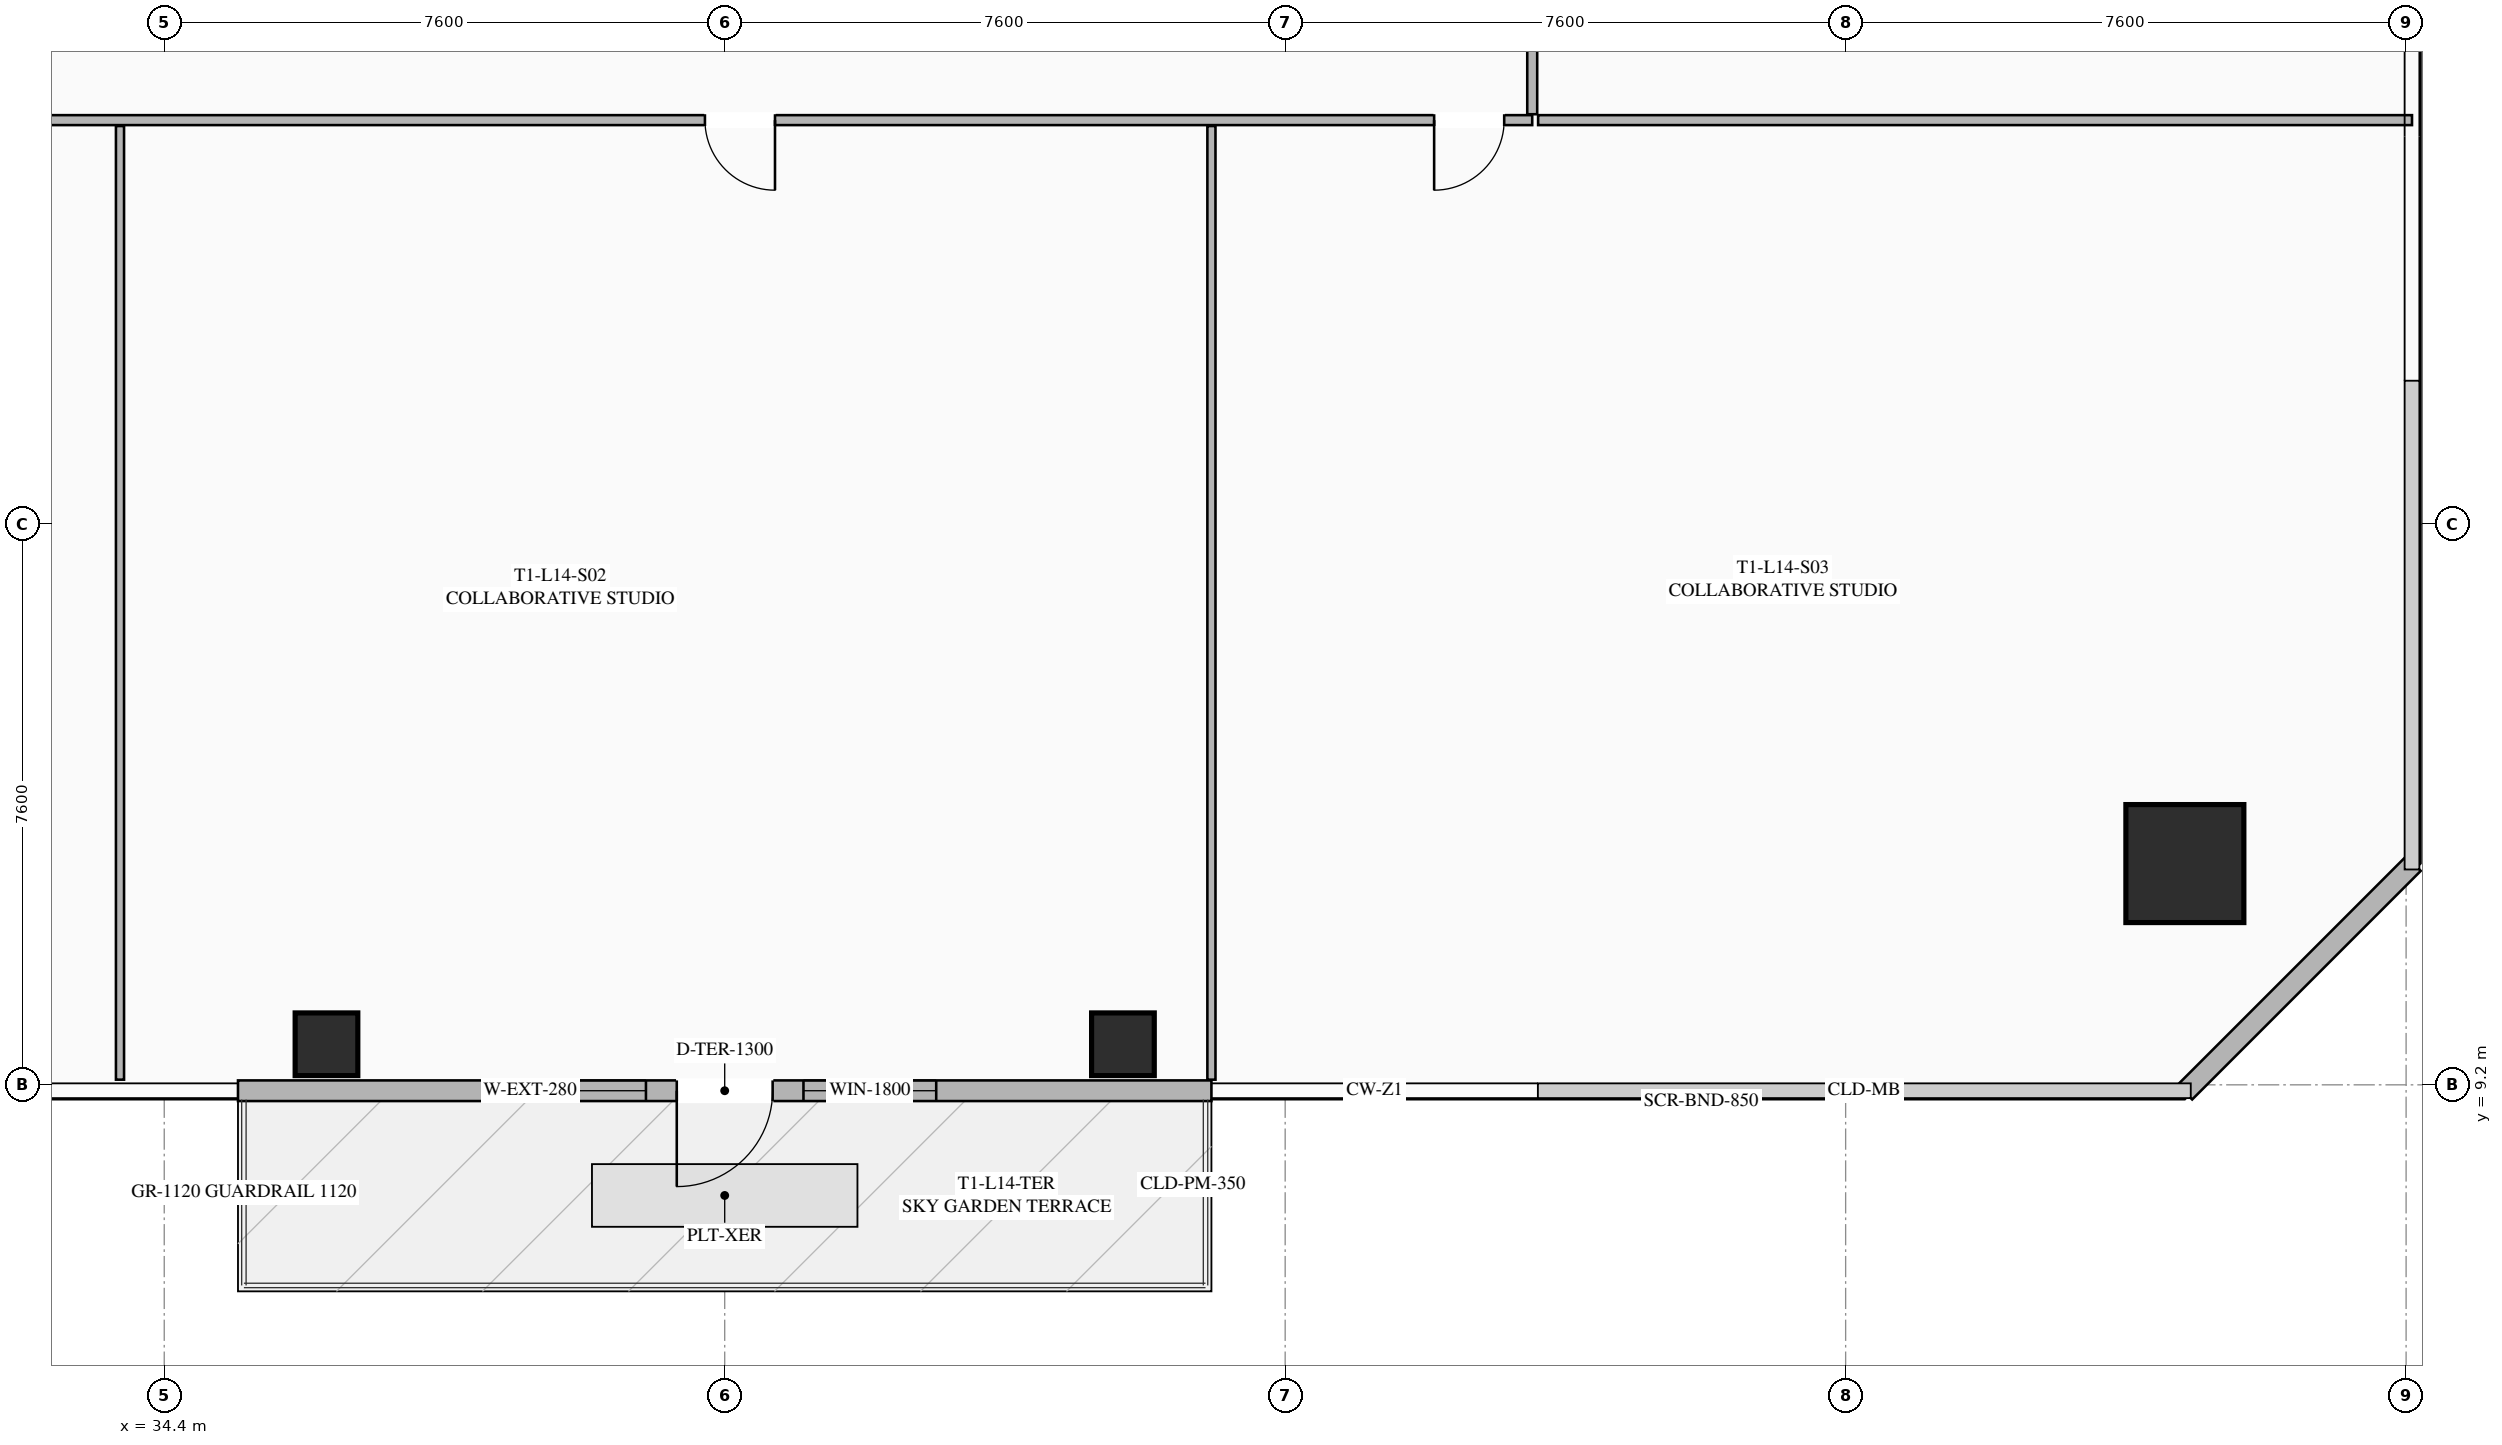
"""IFC4 building model, lengths in metres.
Left out: names, types, materials, properties, quantities, classifications, styles, units other than length and angle.
Written with IfcOpenShell. Run it as: python <this file> out.ifc"""

import sys

from ifc_helpers import new_model, si_unit, direction, frame, frame_2d, origin, origin_2d, place, context, subcontext, project, spatial, rectangle, hollow_rectangle, extrude, element, fill, save


model = new_model("IFC4")
c1 = context("Model", 3, precision=1e-05, world=origin(), true_north=direction((0.0, 1.0)))
c2 = subcontext(c1, "Body", "Model", "MODEL_VIEW")
j1 = project(units=[si_unit("LENGTHUNIT", "METRE"), si_unit("PLANEANGLEUNIT", "RADIAN")], contexts=[c1])
p1 = place(None, origin())
s1 = spatial("IfcSite", under=j1, at=p1, CompositionType="ELEMENT")
p2 = place(p1, origin())
s2 = spatial("IfcBuilding", under=s1, at=p2, CompositionType="ELEMENT")
p3 = place(p2, frame((0.0, 0.0, 56.55)))
s3 = spatial("IfcBuildingStorey", under=s2, at=p3, CompositionType="ELEMENT", Elevation=56.55)
p4 = place(p3, frame((61.8, 12.2, 0.0), z_axis=(0.0, 0.0, 1.0), x_axis=(1.0, 0.0, 0.0)))
e1 = element("IfcColumn", 1, at=p4, inside=s3, PredefinedType="COLUMN", context=c2, shape_type="SweptSolid", body=[
    extrude(hollow_rectangle(XDim=1.6, YDim=1.6, WallThickness=0.06, at=origin_2d()), origin(), (0.0, 0.0, 1.0), 3.35),
])
for number, where, z_axis, x_axis in (
    (2, (36.6, 9.75, 0.0), (0.0, 0.0, 1.0), (1.0, 0.0, 0.0)),
    (3, (47.4, 9.75, 0.0), (0.0, 0.0, 1.0), (1.0, 0.0, 0.0)),
):
    element("IfcColumn", number, at=place(p3, frame(where, z_axis=z_axis, x_axis=x_axis)), inside=s3, PredefinedType="COLUMN", context=c2, shape_type="SweptSolid", body=[
        extrude(hollow_rectangle(XDim=0.85, YDim=0.85, WallThickness=0.035, at=origin_2d()), origin(), (0.0, 0.0, 1.0), 3.35),
    ])
p5 = place(p3, frame((48.6, 9.12, 0.0), z_axis=(0.0, 0.0, 1.0), x_axis=(-1.0, 0.0, 0.0)))
e4 = element("IfcWall", 4, at=p5, inside=s3, PredefinedType="SOLIDWALL", context=c2, shape_type="SweptSolid", body=[
    extrude(rectangle(XDim=13.2, YDim=0.28, at=frame_2d((6.6, 0.0))), origin(), (0.0, 0.0, 1.0), 3.35),
])
p6 = place(p5, frame((5.95, 0.0, 0.0)))
e5 = element("IfcOpeningElement", 5, at=p6, cuts=e4, PredefinedType="OPENING", context=c2, shape_type="SweptSolid", body=[
    extrude(rectangle(XDim=1.3, YDim=2.15, at=frame_2d((0.65, 1.075))), frame((0.0, 0.15, 0.0), z_axis=(0.0, -1.0, 0.0), x_axis=(1.0, 0.0, 0.0)), (0.0, 0.0, 1.0), 0.3),
])
p7 = place(p5, frame((3.732, 0.0, 0.85)))
e6 = element("IfcOpeningElement", 6, at=p7, cuts=e4, PredefinedType="OPENING", context=c2, shape_type="SweptSolid", body=[
    extrude(rectangle(XDim=1.8, YDim=1.92, at=frame_2d((0.9, 0.96))), frame((0.0, 0.15, 0.0), z_axis=(0.0, -1.0, 0.0), x_axis=(1.0, 0.0, 0.0)), (0.0, 0.0, 1.0), 0.3),
])
p8 = place(p5, frame((7.668, 0.0, 0.85)))
e7 = element("IfcOpeningElement", 7, at=p8, cuts=e4, PredefinedType="OPENING", context=c2, shape_type="SweptSolid", body=[
    extrude(rectangle(XDim=1.8, YDim=1.92, at=frame_2d((0.9, 0.96))), frame((0.0, 0.15, 0.0), z_axis=(0.0, -1.0, 0.0), x_axis=(1.0, 0.0, 0.0)), (0.0, 0.0, 1.0), 0.3),
])
p9 = place(p3, frame((64.9, 12.2, 0.0), z_axis=(0.0, 0.0, 1.0), x_axis=(-0.707106781187, -0.707106781187, 0.0)))
e8 = element("IfcWall", 8, at=p9, inside=s3, PredefinedType="SOLIDWALL", context=c2, shape_type="SweptSolid", body=[
    extrude(rectangle(XDim=4.384, YDim=0.28, at=frame_2d((2.192, 0.0))), origin(), (0.0, 0.0, 1.0), 3.35),
])
p10 = place(p3, frame((52.95, 22.28, 0.0), z_axis=(0.0, 0.0, 1.0), x_axis=(-1.0, 0.0, 0.0)))
e9 = element("IfcWall", 9, at=p10, inside=s3, PredefinedType="PARTITIONING", context=c2, shape_type="SweptSolid", body=[
    extrude(rectangle(XDim=30.6, YDim=0.135, at=frame_2d((15.3, 0.0))), origin(), (0.0, 0.0, 1.0), 2.703),
])
p11 = place(p10, frame((29.27, 0.0, 0.0)))
e10 = element("IfcOpeningElement", 10, at=p11, cuts=e9, PredefinedType="OPENING", context=c2, shape_type="SweptSolid", body=[
    extrude(rectangle(XDim=0.95, YDim=2.05, at=frame_2d((0.475, 1.025))), frame((0.0, 0.077, 0.0), z_axis=(0.0, -1.0, 0.0), x_axis=(1.0, 0.0, 0.0)), (0.0, 0.0, 1.0), 0.155),
])
p12 = place(p10, frame((10.268, 0.0, 0.0)))
e11 = element("IfcOpeningElement", 11, at=p12, cuts=e9, PredefinedType="OPENING", context=c2, shape_type="SweptSolid", body=[
    extrude(rectangle(XDim=0.95, YDim=2.05, at=frame_2d((0.475, 1.025))), frame((0.0, 0.077, 0.0), z_axis=(0.0, -1.0, 0.0), x_axis=(1.0, 0.0, 0.0)), (0.0, 0.0, 1.0), 0.155),
])
p13 = place(p10, frame((0.38, 0.0, 0.0)))
e12 = element("IfcOpeningElement", 12, at=p13, cuts=e9, PredefinedType="OPENING", context=c2, shape_type="SweptSolid", body=[
    extrude(rectangle(XDim=0.95, YDim=2.05, at=frame_2d((0.475, 1.025))), frame((0.0, 0.077, 0.0), z_axis=(0.0, -1.0, 0.0), x_axis=(1.0, 0.0, 0.0)), (0.0, 0.0, 1.0), 0.155),
])
for number, where, z_axis, x_axis in (
    (13, (33.8, 9.27, 0.0), (0.0, 0.0, 1.0), (0.0, 1.0, 0.0)),
    (14, (48.6, 9.27, 0.0), (0.0, 0.0, 1.0), (0.0, 1.0, 0.0)),
):
    element("IfcWall", number, at=place(p3, frame(where, z_axis=z_axis, x_axis=x_axis)), inside=s3, PredefinedType="PARTITIONING", context=c2, shape_type="SweptSolid", body=[
        extrude(rectangle(XDim=12.93, YDim=0.11, at=frame_2d((6.465, 0.0))), origin(), (0.0, 0.0, 1.0), 2.703),
    ])
p14 = place(p3, frame((52.95, 41.27, 0.0), z_axis=(0.0, 0.0, 1.0), x_axis=(0.0, -1.0, 0.0)))
e15 = element("IfcWall", 15, at=p14, inside=s3, PredefinedType="PARTITIONING", context=c2, shape_type="SweptSolid", body=[
    extrude(rectangle(XDim=18.91, YDim=0.135, at=frame_2d((9.455, 0.0))), origin(), (0.0, 0.0, 1.0), 2.703),
])
p15 = place(p14, frame((8.603, 0.0, 0.0)))
e16 = element("IfcOpeningElement", 16, at=p15, cuts=e15, PredefinedType="OPENING", context=c2, shape_type="SweptSolid", body=[
    extrude(rectangle(XDim=0.95, YDim=2.05, at=frame_2d((0.475, 1.025))), frame((0.0, 0.077, 0.0), z_axis=(0.0, -1.0, 0.0), x_axis=(1.0, 0.0, 0.0)), (0.0, 0.0, 1.0), 0.155),
])
p16 = place(p3, frame((53.03, 22.28, 0.0), z_axis=(0.0, 0.0, 1.0), x_axis=(1.0, 0.0, 0.0)))
e17 = element("IfcWall", 17, at=p16, inside=s3, PredefinedType="PARTITIONING", context=c2, shape_type="SweptSolid", body=[
    extrude(rectangle(XDim=11.85, YDim=0.135, at=frame_2d((5.925, 0.0))), origin(), (0.0, 0.0, 1.0), 2.703),
])
p17 = place(p6, origin())
e18 = element("IfcDoor", 18, at=p17, inside=s3, OperationType="SINGLE_SWING_RIGHT", PredefinedType="DOOR", context=c2, shape_type="SweptSolid", body=[
    extrude(rectangle(XDim=1.3, YDim=2.15, at=frame_2d((0.65, 1.075))), frame((0.0, 0.025, 0.0), z_axis=(0.0, -1.0, 0.0), x_axis=(1.0, 0.0, 0.0)), (0.0, 0.0, 1.0), 0.05),
])
fill(e5, e18)
p18 = place(p7, origin())
e19 = element("IfcWindow", 19, at=p18, inside=s3, PartitioningType="SINGLE_PANEL", PredefinedType="WINDOW", context=c2, shape_type="SweptSolid", body=[
    extrude(rectangle(XDim=1.8, YDim=1.92, at=frame_2d((0.9, 0.96))), frame((0.0, 0.03, 0.0), z_axis=(0.0, -1.0, 0.0), x_axis=(1.0, 0.0, 0.0)), (0.0, 0.0, 1.0), 0.06),
])
fill(e6, e19)
p19 = place(p8, origin())
e20 = element("IfcWindow", 20, at=p19, inside=s3, PartitioningType="SINGLE_PANEL", PredefinedType="WINDOW", context=c2, shape_type="SweptSolid", body=[
    extrude(rectangle(XDim=1.8, YDim=1.92, at=frame_2d((0.9, 0.96))), frame((0.0, 0.03, 0.0), z_axis=(0.0, -1.0, 0.0), x_axis=(1.0, 0.0, 0.0)), (0.0, 0.0, 1.0), 0.06),
])
fill(e7, e20)
p20 = place(p12, origin())
e21 = element("IfcDoor", 21, at=p20, inside=s3, OperationType="SINGLE_SWING_LEFT", PredefinedType="DOOR", context=c2, shape_type="SweptSolid", body=[
    extrude(rectangle(XDim=0.95, YDim=2.05, at=frame_2d((0.475, 1.025))), frame((0.0, 0.025, 0.0), z_axis=(0.0, -1.0, 0.0), x_axis=(1.0, 0.0, 0.0)), (0.0, 0.0, 1.0), 0.05),
])
fill(e11, e21)
p21 = place(p13, origin())
e22 = element("IfcDoor", 22, at=p21, inside=s3, OperationType="SINGLE_SWING_RIGHT", PredefinedType="DOOR", context=c2, shape_type="SweptSolid", body=[
    extrude(rectangle(XDim=0.95, YDim=2.05, at=frame_2d((0.475, 1.025))), frame((0.0, 0.025, 0.0), z_axis=(0.0, -1.0, 0.0), x_axis=(1.0, 0.0, 0.0)), (0.0, 0.0, 1.0), 0.05),
])
fill(e12, e22)
save(model, sys.argv[1])
